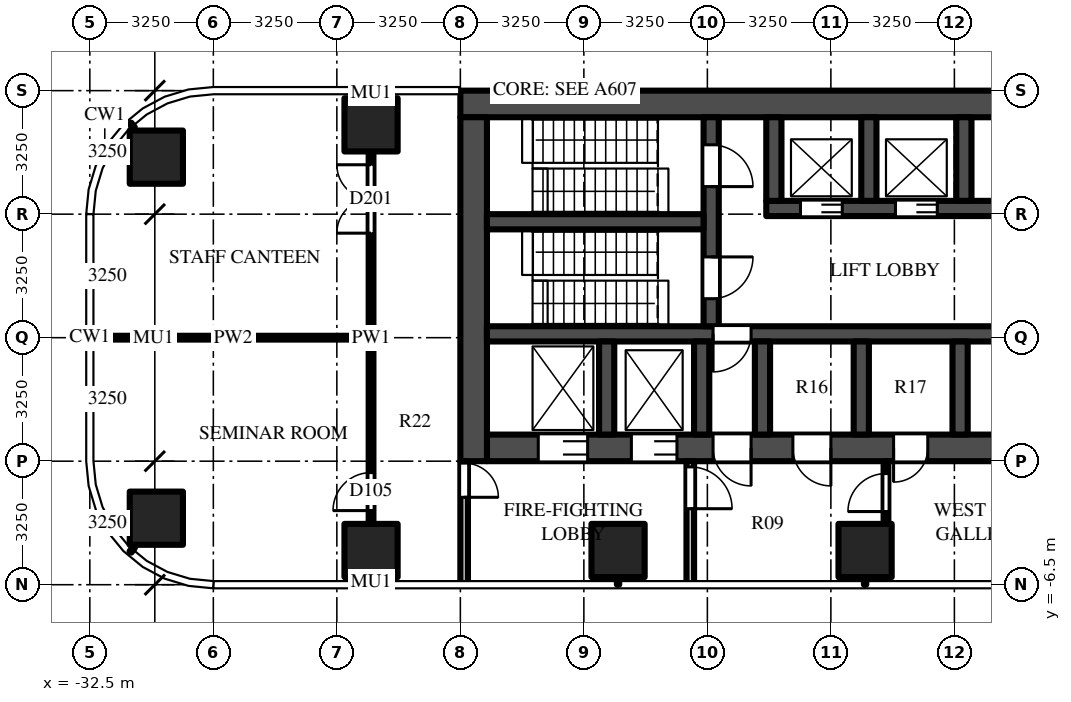
"""IFC4 building model, lengths in metres.
Left out: names, types, materials, properties, quantities, classifications, styles, units other than length and angle.
Written with IfcOpenShell. Run it as: python <this file> out.ifc"""

import sys

from ifc_helpers import new_model, si_unit, direction, frame, frame_2d, origin, origin_2d, place, context, subcontext, project, spatial, rectangle, extrude, source, transform, mapped, element, fill, save


model = new_model("IFC4")
c1 = context("Model", 3, precision=1e-05, world=origin(), true_north=direction((0.0, 1.0)))
c2 = subcontext(c1, "Body", "Model", "MODEL_VIEW")
j1 = project(units=[si_unit("LENGTHUNIT", "METRE"), si_unit("PLANEANGLEUNIT", "RADIAN")], contexts=[c1])
p1 = place(None, origin())
s1 = spatial("IfcSite", under=j1, at=p1, CompositionType="ELEMENT")
p2 = place(p1, origin())
s2 = spatial("IfcBuilding", under=s1, at=p2, CompositionType="ELEMENT")
p3 = place(p2, frame((0.0, 0.0, 38.5)))
s3 = spatial("IfcBuildingStorey", under=s2, at=p3, CompositionType="ELEMENT", Elevation=38.5)
m1 = source(origin(), c2, "Body", "SweptSolid", [
    extrude(rectangle(XDim=1.4, YDim=1.4, at=origin_2d()), origin(), (0.0, 0.0, 1.0), 4.5),
])
for number, where, z_axis, x_axis in (
    (1, (-12.1, -5.6, 0.0), (0.0, 0.0, 1.0), (1.0, 0.0, 0.0)),
    (2, (-18.6, -5.6, 0.0), (0.0, 0.0, 1.0), (1.0, 0.0, 0.0)),
    (3, (-25.1, -5.6, 0.0), (0.0, 0.0, 1.0), (1.0, 0.0, 0.0)),
    (4, (-30.75, -4.75, 0.0), (0.0, 0.0, 1.0), (1.0, 0.0, 0.0)),
    (5, (-25.1, 5.6, 0.0), (0.0, 0.0, 1.0), (1.0, 0.0, 0.0)),
    (6, (-30.75, 4.75, 0.0), (0.0, 0.0, 1.0), (1.0, 0.0, 0.0)),
):
    element("IfcColumn", number, at=place(p3, frame(where, z_axis=z_axis, x_axis=x_axis)), inside=s3, PredefinedType="COLUMN", context=c2, shape_type="MappedRepresentation", body=[
        mapped(m1, transform((0.0, 0.0, 0.0))),
    ])
m2 = source(origin(), c2, "Body", "SweptSolid", [
    extrude(rectangle(XDim=16.45, YDim=0.7, at=frame_2d((8.225, 0.0))), origin(), (0.0, 0.0, 1.0), 4.25),
])
p4 = place(p3, frame((-6.3, 6.15, 0.0), z_axis=(0.0, 0.0, 1.0), x_axis=(-1.0, 0.0, 0.0)))
e7 = element("IfcWall", 7, at=p4, inside=s3, PredefinedType="SHEAR", context=c2, shape_type="MappedRepresentation", body=[
    mapped(m2, transform((0.0, 0.0, 0.0))),
])
m3 = source(origin(), c2, "Body", "SweptSolid", [
    extrude(rectangle(XDim=14.85, YDim=0.7, at=frame_2d((7.425, 0.0))), origin(), (0.0, 0.0, 1.0), 4.25),
])
p5 = place(p3, frame((-7.2, -2.9, 0.0), z_axis=(0.0, 0.0, 1.0), x_axis=(-1.0, 0.0, 0.0)))
e8 = element("IfcWall", 8, at=p5, inside=s3, PredefinedType="SHEAR", context=c2, shape_type="MappedRepresentation", body=[
    mapped(m3, transform((0.0, 0.0, 0.0))),
])
m4 = source(origin(), c2, "Body", "SweptSolid", [
    extrude(rectangle(XDim=1.3, YDim=2.1, at=frame_2d((0.65, 1.05))), frame((0.0, 0.36, 0.0), z_axis=(0.0, -1.0, 0.0), x_axis=(1.0, 0.0, 0.0)), (0.0, 0.0, 1.0), 0.72),
])
p6 = place(p5, frame((12.2, 0.0, 0.0)))
e9 = element("IfcOpeningElement", 9, at=p6, cuts=e8, PredefinedType="OPENING", context=c2, shape_type="MappedRepresentation", body=[
    mapped(m4, transform((0.0, 0.0, 0.0))),
])
m5 = source(origin(), c2, "Body", "SweptSolid", [
    extrude(rectangle(XDim=1.2, YDim=2.1, at=frame_2d((0.6, 1.05))), frame((0.0, 0.36, 0.0), z_axis=(0.0, -1.0, 0.0), x_axis=(1.0, 0.0, 0.0)), (0.0, 0.0, 1.0), 0.72),
])
p7 = place(p5, frame((9.85, 0.0, 0.0)))
e10 = element("IfcOpeningElement", 10, at=p7, cuts=e8, PredefinedType="OPENING", context=c2, shape_type="MappedRepresentation", body=[
    mapped(m5, transform((0.0, 0.0, 0.0))),
])
m6 = source(origin(), c2, "Body", "SweptSolid", [
    extrude(rectangle(XDim=1.0, YDim=2.1, at=frame_2d((0.5, 1.05))), frame((0.0, 0.36, 0.0), z_axis=(0.0, -1.0, 0.0), x_axis=(1.0, 0.0, 0.0)), (0.0, 0.0, 1.0), 0.72),
])
p8 = place(p5, frame((7.9, 0.0, 0.0)))
e11 = element("IfcOpeningElement", 11, at=p8, cuts=e8, PredefinedType="OPENING", context=c2, shape_type="MappedRepresentation", body=[
    mapped(m6, transform((0.0, 0.0, 0.0))),
])
m7 = source(origin(), c2, "Body", "SweptSolid", [
    extrude(rectangle(XDim=0.9, YDim=2.1, at=frame_2d((0.45, 1.05))), frame((0.0, 0.36, 0.0), z_axis=(0.0, -1.0, 0.0), x_axis=(1.0, 0.0, 0.0)), (0.0, 0.0, 1.0), 0.72),
])
p9 = place(p5, frame((0.65, 0.0, 0.0)))
e12 = element("IfcOpeningElement", 12, at=p9, cuts=e8, PredefinedType="OPENING", context=c2, shape_type="MappedRepresentation", body=[
    mapped(m7, transform((0.0, 0.0, 0.0))),
])
p10 = place(p5, frame((3.25, 0.0, 0.0)))
e13 = element("IfcOpeningElement", 13, at=p10, cuts=e8, PredefinedType="OPENING", context=c2, shape_type="MappedRepresentation", body=[
    mapped(m7, transform((0.0, 0.0, 0.0))),
])
p11 = place(p5, frame((5.8, 0.0, 0.0)))
e14 = element("IfcOpeningElement", 14, at=p11, cuts=e8, PredefinedType="OPENING", context=c2, shape_type="MappedRepresentation", body=[
    mapped(m6, transform((0.0, 0.0, 0.0))),
])
m8 = source(origin(), c2, "Body", "SweptSolid", [
    extrude(rectangle(XDim=9.05, YDim=0.7, at=frame_2d((4.525, 0.0))), origin(), (0.0, 0.0, 1.0), 4.25),
])
p12 = place(p3, frame((-22.4, 5.8, 0.0), z_axis=(0.0, 0.0, 1.0), x_axis=(0.0, -1.0, 0.0)))
e15 = element("IfcWall", 15, at=p12, inside=s3, PredefinedType="SHEAR", context=c2, shape_type="MappedRepresentation", body=[
    mapped(m8, transform((0.0, 0.0, 0.0))),
])
m9 = source(origin(), c2, "Body", "SweptSolid", [
    extrude(rectangle(XDim=7.5, YDim=0.4, at=frame_2d((3.75, 0.0))), origin(), (0.0, 0.0, 1.0), 4.25),
])
p13 = place(p3, frame((-7.2, 3.4, 0.0), z_axis=(0.0, 0.0, 1.0), x_axis=(-1.0, 0.0, 0.0)))
e16 = element("IfcWall", 16, at=p13, inside=s3, PredefinedType="SHEAR", context=c2, shape_type="MappedRepresentation", body=[
    mapped(m9, transform((0.0, 0.0, 0.0))),
])
m10 = source(origin(), c2, "Body", "SweptSolid", [
    extrude(rectangle(XDim=1.1, YDim=2.1, at=frame_2d((0.55, 1.05))), frame((0.0, 0.21, 0.0), z_axis=(0.0, -1.0, 0.0), x_axis=(1.0, 0.0, 0.0)), (0.0, 0.0, 1.0), 0.42),
])
p14 = place(p13, frame((3.0, 0.0, 0.0)))
e17 = element("IfcOpeningElement", 17, at=p14, cuts=e16, PredefinedType="OPENING", context=c2, shape_type="MappedRepresentation", body=[
    mapped(m10, transform((0.0, 0.0, 0.0))),
])
p15 = place(p13, frame((5.5, 0.0, 0.0)))
e18 = element("IfcOpeningElement", 18, at=p15, cuts=e16, PredefinedType="OPENING", context=c2, shape_type="MappedRepresentation", body=[
    mapped(m10, transform((0.0, 0.0, 0.0))),
])
m11 = source(origin(), c2, "Body", "SweptSolid", [
    extrude(rectangle(XDim=14.85, YDim=0.4, at=frame_2d((7.425, 0.0))), origin(), (0.0, 0.0, 1.0), 4.25),
])
p16 = place(p3, frame((-7.2, 0.1, 0.0), z_axis=(0.0, 0.0, 1.0), x_axis=(-1.0, 0.0, 0.0)))
e19 = element("IfcWall", 19, at=p16, inside=s3, PredefinedType="SHEAR", context=c2, shape_type="MappedRepresentation", body=[
    mapped(m11, transform((0.0, 0.0, 0.0))),
])
m12 = source(origin(), c2, "Body", "SweptSolid", [
    extrude(rectangle(XDim=1.0, YDim=2.1, at=frame_2d((0.5, 1.05))), frame((0.0, 0.21, 0.0), z_axis=(0.0, -1.0, 0.0), x_axis=(1.0, 0.0, 0.0)), (0.0, 0.0, 1.0), 0.42),
])
p17 = place(p16, frame((7.9, 0.0, 0.0)))
e20 = element("IfcOpeningElement", 20, at=p17, cuts=e19, PredefinedType="OPENING", context=c2, shape_type="MappedRepresentation", body=[
    mapped(m12, transform((0.0, 0.0, 0.0))),
])
m13 = source(origin(), c2, "Body", "SweptSolid", [
    extrude(rectangle(XDim=5.5, YDim=0.4, at=frame_2d((2.75, 0.0))), origin(), (0.0, 0.0, 1.0), 4.25),
])
p18 = place(p3, frame((-16.15, 5.8, 0.0), z_axis=(0.0, 0.0, 1.0), x_axis=(0.0, -1.0, 0.0)))
e21 = element("IfcWall", 21, at=p18, inside=s3, PredefinedType="SHEAR", context=c2, shape_type="MappedRepresentation", body=[
    mapped(m13, transform((0.0, 0.0, 0.0))),
])
p19 = place(p18, frame((0.725, 0.0, 0.0)))
e22 = element("IfcOpeningElement", 22, at=p19, cuts=e21, PredefinedType="OPENING", context=c2, shape_type="MappedRepresentation", body=[
    mapped(m10, transform((0.0, 0.0, 0.0))),
])
p20 = place(p18, frame((3.675, 0.0, 0.0)))
e23 = element("IfcOpeningElement", 23, at=p20, cuts=e21, PredefinedType="OPENING", context=c2, shape_type="MappedRepresentation", body=[
    mapped(m10, transform((0.0, 0.0, 0.0))),
])
m14 = source(origin(), c2, "Body", "SweptSolid", [
    extrude(rectangle(XDim=5.7, YDim=0.4, at=frame_2d((2.85, 0.0))), origin(), (0.0, 0.0, 1.0), 4.25),
])
p21 = place(p3, frame((-16.35, 3.05, 0.0), z_axis=(0.0, 0.0, 1.0), x_axis=(-1.0, 0.0, 0.0)))
e24 = element("IfcWall", 24, at=p21, inside=s3, PredefinedType="SHEAR", context=c2, shape_type="MappedRepresentation", body=[
    mapped(m14, transform((0.0, 0.0, 0.0))),
])
m15 = source(origin(), c2, "Body", "SweptSolid", [
    extrude(rectangle(XDim=2.2, YDim=0.4, at=frame_2d((1.1, 0.0))), origin(), (0.0, 0.0, 1.0), 4.25),
])
for number, where, z_axis, x_axis in (
    (25, (-9.5, 5.8, 0.0), (0.0, 0.0, 1.0), (0.0, -1.0, 0.0)),
    (26, (-12.0, 5.8, 0.0), (0.0, 0.0, 1.0), (0.0, -1.0, 0.0)),
    (27, (-14.5, 5.8, 0.0), (0.0, 0.0, 1.0), (0.0, -1.0, 0.0)),
):
    element("IfcWall", number, at=place(p3, frame(where, z_axis=z_axis, x_axis=x_axis)), inside=s3, PredefinedType="SHEAR", context=c2, shape_type="MappedRepresentation", body=[
        mapped(m15, transform((0.0, 0.0, 0.0))),
    ])
m16 = source(origin(), c2, "Body", "SweptSolid", [
    extrude(rectangle(XDim=2.45, YDim=0.4, at=frame_2d((1.225, 0.0))), origin(), (0.0, 0.0, 1.0), 4.25),
])
for number, where, z_axis, x_axis in (
    (28, (-9.6, -0.1, 0.0), (0.0, 0.0, 1.0), (0.0, -1.0, 0.0)),
    (29, (-12.2, -0.1, 0.0), (0.0, 0.0, 1.0), (0.0, -1.0, 0.0)),
    (30, (-14.8, -0.1, 0.0), (0.0, 0.0, 1.0), (0.0, -1.0, 0.0)),
    (31, (-16.4, -0.1, 0.0), (0.0, 0.0, 1.0), (0.0, -1.0, 0.0)),
    (32, (-18.9, -0.1, 0.0), (0.0, 0.0, 1.0), (0.0, -1.0, 0.0)),
):
    element("IfcWall", number, at=place(p3, frame(where, z_axis=z_axis, x_axis=x_axis)), inside=s3, PredefinedType="SHEAR", context=c2, shape_type="MappedRepresentation", body=[
        mapped(m16, transform((0.0, 0.0, 0.0))),
    ])
m17 = source(origin(), c2, "Body", "SweptSolid", [
    extrude(rectangle(XDim=3.25, YDim=0.2, at=frame_2d((1.625, 0.0))), origin(), (0.0, 0.0, 1.0), 4.25),
])
p22 = place(p3, frame((-16.7, -3.25, 0.0), z_axis=(0.0, 0.0, 1.0), x_axis=(0.0, -1.0, 0.0)))
e33 = element("IfcWall", 33, at=p22, inside=s3, PredefinedType="PARTITIONING", context=c2, shape_type="MappedRepresentation", body=[
    mapped(m17, transform((0.0, 0.0, 0.0))),
])
m18 = source(origin(), c2, "Body", "SweptSolid", [
    extrude(rectangle(XDim=1.1, YDim=2.1, at=frame_2d((0.55, 1.05))), frame((0.0, 0.11, 0.0), z_axis=(0.0, -1.0, 0.0), x_axis=(1.0, 0.0, 0.0)), (0.0, 0.0, 1.0), 0.22),
])
p23 = place(p22, frame((0.15, 0.0, 0.0)))
e34 = element("IfcOpeningElement", 34, at=p23, cuts=e33, PredefinedType="OPENING", context=c2, shape_type="MappedRepresentation", body=[
    mapped(m18, transform((0.0, 0.0, 0.0))),
])
p24 = place(p3, frame((-22.65, -3.25, 0.0), z_axis=(0.0, 0.0, 1.0), x_axis=(0.0, -1.0, 0.0)))
e35 = element("IfcWall", 35, at=p24, inside=s3, PredefinedType="PARTITIONING", context=c2, shape_type="MappedRepresentation", body=[
    mapped(m17, transform((0.0, 0.0, 0.0))),
])
m19 = source(origin(), c2, "Body", "SweptSolid", [
    extrude(rectangle(XDim=0.9, YDim=2.1, at=frame_2d((0.45, 1.05))), frame((0.0, 0.11, 0.0), z_axis=(0.0, -1.0, 0.0), x_axis=(1.0, 0.0, 0.0)), (0.0, 0.0, 1.0), 0.22),
])
p25 = place(p24, frame((0.05, 0.0, 0.0)))
e36 = element("IfcOpeningElement", 36, at=p25, cuts=e35, PredefinedType="OPENING", context=c2, shape_type="MappedRepresentation", body=[
    mapped(m19, transform((0.0, 0.0, 0.0))),
])
m20 = source(origin(), c2, "Body", "SweptSolid", [
    extrude(rectangle(XDim=9.8, YDim=0.125, at=frame_2d((4.9, 0.0))), origin(), (0.0, 0.0, 1.0), 3.468),
])
p26 = place(p3, frame((-25.1, -4.9, 0.0), z_axis=(0.0, 0.0, 1.0), x_axis=(0.0, 1.0, 0.0)))
e37 = element("IfcWall", 37, at=p26, inside=s3, PredefinedType="PARTITIONING", context=c2, shape_type="MappedRepresentation", body=[
    mapped(m20, transform((0.0, 0.0, 0.0))),
])
m21 = source(origin(), c2, "Body", "SweptSolid", [
    extrude(rectangle(XDim=1.0, YDim=2.1, at=frame_2d((0.5, 1.05))), frame((0.0, 0.073, 0.0), z_axis=(0.0, -1.0, 0.0), x_axis=(1.0, 0.0, 0.0)), (0.0, 0.0, 1.0), 0.145),
])
p27 = place(p26, frame((0.35, 0.0, 0.0)))
e38 = element("IfcOpeningElement", 38, at=p27, cuts=e37, PredefinedType="OPENING", context=c2, shape_type="MappedRepresentation", body=[
    mapped(m21, transform((0.0, 0.0, 0.0))),
])
m22 = source(origin(), c2, "Body", "SweptSolid", [
    extrude(rectangle(XDim=1.8, YDim=2.1, at=frame_2d((0.9, 1.05))), frame((0.0, 0.073, 0.0), z_axis=(0.0, -1.0, 0.0), x_axis=(1.0, 0.0, 0.0)), (0.0, 0.0, 1.0), 0.145),
])
p28 = place(p26, frame((7.65, 0.0, 0.0)))
e39 = element("IfcOpeningElement", 39, at=p28, cuts=e37, PredefinedType="OPENING", context=c2, shape_type="MappedRepresentation", body=[
    mapped(m22, transform((0.0, 0.0, 0.0))),
])
m23 = source(origin(), c2, "Body", "SweptSolid", [
    extrude(rectangle(XDim=1.65, YDim=0.125, at=frame_2d((0.825, 0.0))), origin(), (0.0, 0.0, 1.0), 4.25),
])
p29 = place(p3, frame((-11.55, -4.9, 0.0), z_axis=(0.0, 0.0, 1.0), x_axis=(0.0, 1.0, 0.0)))
e40 = element("IfcWall", 40, at=p29, inside=s3, PredefinedType="PARTITIONING", context=c2, shape_type="MappedRepresentation", body=[
    mapped(m23, transform((0.0, 0.0, 0.0))),
])
p30 = place(p29, frame((0.325, 0.0, 0.0)))
e41 = element("IfcOpeningElement", 41, at=p30, cuts=e40, PredefinedType="OPENING", context=c2, shape_type="MappedRepresentation", body=[
    mapped(m21, transform((0.0, 0.0, 0.0))),
])
m24 = source(origin(), c2, "Body", "SweptSolid", [
    extrude(rectangle(XDim=7.137, YDim=0.1, at=frame_2d((3.569, 0.0))), origin(), (0.0, 0.0, 1.0), 3.33),
])
p31 = place(p3, frame((-32.3, 0.0, 0.0), z_axis=(0.0, 0.0, 1.0), x_axis=(1.0, 0.0, 0.0)))
e42 = element("IfcWall", 42, at=p31, inside=s3, PredefinedType="PARTITIONING", context=c2, shape_type="MappedRepresentation", body=[
    mapped(m24, transform((0.0, 0.0, 0.0))),
])
m25 = source(origin(), c2, "Body", "SweptSolid", [
    extrude(rectangle(XDim=1.1, YDim=2.1, at=frame_2d((0.55, 1.05))), frame((0.0, 0.025, 0.0), z_axis=(0.0, -1.0, 0.0), x_axis=(1.0, 0.0, 0.0)), (0.0, 0.0, 1.0), 0.05),
])
p32 = place(p14, origin())
e43 = element("IfcDoor", 43, at=p32, inside=s3, OperationType="DOUBLE_DOOR_SLIDING", PredefinedType="DOOR", context=c2, shape_type="MappedRepresentation", body=[
    mapped(m25, transform((0.0, 0.0, 0.0))),
])
fill(e17, e43)
p33 = place(p15, origin())
e44 = element("IfcDoor", 44, at=p33, inside=s3, OperationType="DOUBLE_DOOR_SLIDING", PredefinedType="DOOR", context=c2, shape_type="MappedRepresentation", body=[
    mapped(m25, transform((0.0, 0.0, 0.0))),
])
fill(e18, e44)
m26 = source(origin(), c2, "Body", "SweptSolid", [
    extrude(rectangle(XDim=1.3, YDim=2.1, at=frame_2d((0.65, 1.05))), frame((0.0, -0.275, 0.0), z_axis=(0.0, -1.0, 0.0), x_axis=(1.0, 0.0, 0.0)), (0.0, 0.0, 1.0), 0.05),
])
p34 = place(p6, origin())
e45 = element("IfcDoor", 45, at=p34, inside=s3, OperationType="DOUBLE_DOOR_SLIDING", PredefinedType="DOOR", context=c2, shape_type="MappedRepresentation", body=[
    mapped(m26, transform((0.0, 0.0, 0.0))),
])
fill(e9, e45)
m27 = source(origin(), c2, "Body", "SweptSolid", [
    extrude(rectangle(XDim=1.2, YDim=2.1, at=frame_2d((0.6, 1.05))), frame((0.0, -0.275, 0.0), z_axis=(0.0, -1.0, 0.0), x_axis=(1.0, 0.0, 0.0)), (0.0, 0.0, 1.0), 0.05),
])
p35 = place(p7, origin())
e46 = element("IfcDoor", 46, at=p35, inside=s3, OperationType="DOUBLE_DOOR_SLIDING", PredefinedType="DOOR", context=c2, shape_type="MappedRepresentation", body=[
    mapped(m27, transform((0.0, 0.0, 0.0))),
])
fill(e10, e46)
p36 = place(p19, origin())
e47 = element("IfcDoor", 47, at=p36, inside=s3, OperationType="SINGLE_SWING_RIGHT", PredefinedType="DOOR", context=c2, shape_type="MappedRepresentation", body=[
    mapped(m25, transform((0.0, 0.0, 0.0))),
])
fill(e22, e47)
p37 = place(p20, origin())
e48 = element("IfcDoor", 48, at=p37, inside=s3, OperationType="SINGLE_SWING_LEFT", PredefinedType="DOOR", context=c2, shape_type="MappedRepresentation", body=[
    mapped(m25, transform((0.0, 0.0, 0.0))),
])
fill(e23, e48)
m28 = source(origin(), c2, "Body", "SweptSolid", [
    extrude(rectangle(XDim=1.0, YDim=2.1, at=frame_2d((0.5, 1.05))), frame((0.0, 0.025, 0.0), z_axis=(0.0, -1.0, 0.0), x_axis=(1.0, 0.0, 0.0)), (0.0, 0.0, 1.0), 0.05),
])
p38 = place(p17, origin())
e49 = element("IfcDoor", 49, at=p38, inside=s3, OperationType="SINGLE_SWING_RIGHT", PredefinedType="DOOR", context=c2, shape_type="MappedRepresentation", body=[
    mapped(m28, transform((0.0, 0.0, 0.0))),
])
fill(e20, e49)
m29 = source(origin(), c2, "Body", "SweptSolid", [
    extrude(rectangle(XDim=1.0, YDim=2.1, at=frame_2d((0.5, 1.05))), frame((0.0, -0.275, 0.0), z_axis=(0.0, -1.0, 0.0), x_axis=(1.0, 0.0, 0.0)), (0.0, 0.0, 1.0), 0.05),
])
p39 = place(p8, origin())
e50 = element("IfcDoor", 50, at=p39, inside=s3, OperationType="SINGLE_SWING_LEFT", PredefinedType="DOOR", context=c2, shape_type="MappedRepresentation", body=[
    mapped(m29, transform((0.0, 0.0, 0.0))),
])
fill(e11, e50)
p40 = place(p23, origin())
e51 = element("IfcDoor", 51, at=p40, inside=s3, OperationType="SINGLE_SWING_RIGHT", PredefinedType="DOOR", context=c2, shape_type="MappedRepresentation", body=[
    mapped(m25, transform((0.0, 0.0, 0.0))),
])
fill(e34, e51)
m30 = source(origin(), c2, "Body", "SweptSolid", [
    extrude(rectangle(XDim=0.9, YDim=2.1, at=frame_2d((0.45, 1.05))), frame((0.0, 0.025, 0.0), z_axis=(0.0, -1.0, 0.0), x_axis=(1.0, 0.0, 0.0)), (0.0, 0.0, 1.0), 0.05),
])
p41 = place(p25, origin())
e52 = element("IfcDoor", 52, at=p41, inside=s3, OperationType="SINGLE_SWING_RIGHT", PredefinedType="DOOR", context=c2, shape_type="MappedRepresentation", body=[
    mapped(m30, transform((0.0, 0.0, 0.0))),
])
fill(e36, e52)
m31 = source(origin(), c2, "Body", "SweptSolid", [
    extrude(rectangle(XDim=0.9, YDim=2.1, at=frame_2d((0.45, 1.05))), frame((0.0, -0.275, 0.0), z_axis=(0.0, -1.0, 0.0), x_axis=(1.0, 0.0, 0.0)), (0.0, 0.0, 1.0), 0.05),
])
p42 = place(p10, origin())
e53 = element("IfcDoor", 53, at=p42, inside=s3, OperationType="SINGLE_SWING_RIGHT", PredefinedType="DOOR", context=c2, shape_type="MappedRepresentation", body=[
    mapped(m31, transform((0.0, 0.0, 0.0))),
])
fill(e13, e53)
p43 = place(p11, origin())
e54 = element("IfcDoor", 54, at=p43, inside=s3, OperationType="SINGLE_SWING_LEFT", PredefinedType="DOOR", context=c2, shape_type="MappedRepresentation", body=[
    mapped(m29, transform((0.0, 0.0, 0.0))),
])
fill(e14, e54)
p44 = place(p30, origin())
e55 = element("IfcDoor", 55, at=p44, inside=s3, OperationType="SINGLE_SWING_LEFT", PredefinedType="DOOR", context=c2, shape_type="MappedRepresentation", body=[
    mapped(m28, transform((0.0, 0.0, 0.0))),
])
fill(e41, e55)
p45 = place(p27, origin())
e56 = element("IfcDoor", 56, at=p45, inside=s3, OperationType="SINGLE_SWING_LEFT", PredefinedType="DOOR", context=c2, shape_type="MappedRepresentation", body=[
    mapped(m28, transform((0.0, 0.0, 0.0))),
])
fill(e38, e56)
m32 = source(origin(), c2, "Body", "SweptSolid", [
    extrude(rectangle(XDim=1.8, YDim=2.1, at=frame_2d((0.9, 1.05))), frame((0.0, 0.025, 0.0), z_axis=(0.0, -1.0, 0.0), x_axis=(1.0, 0.0, 0.0)), (0.0, 0.0, 1.0), 0.05),
])
p46 = place(p28, origin())
e57 = element("IfcDoor", 57, at=p46, inside=s3, OperationType="DOUBLE_DOOR_SINGLE_SWING", PredefinedType="DOOR", context=c2, shape_type="MappedRepresentation", body=[
    mapped(m32, transform((0.0, 0.0, 0.0))),
])
fill(e39, e57)
save(model, sys.argv[1])
